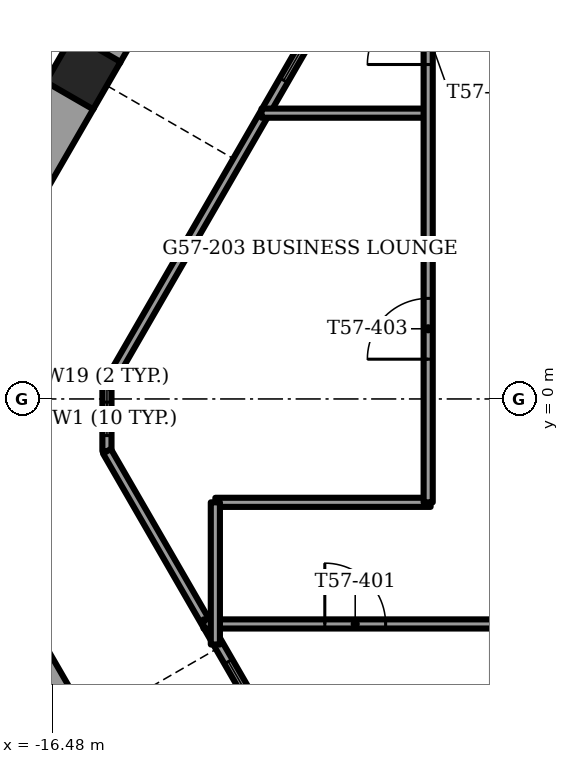
"""IFC4 building model, lengths in metres.
Left out: names, types, materials, properties, quantities, classifications, styles, units other than length and angle.
Written with IfcOpenShell. Run it as: python <this file> out.ifc"""

import sys

from ifc_helpers import new_model, si_unit, direction, frame, frame_2d, origin, origin_2d, place, context, subcontext, project, spatial, rectangle, extrude, element, fill, save


model = new_model("IFC4")
c1 = context("Model", 3, precision=1e-05, world=origin(), true_north=direction((0.0, 1.0)))
c2 = subcontext(c1, "Body", "Model", "MODEL_VIEW")
j1 = project(units=[si_unit("LENGTHUNIT", "METRE"), si_unit("PLANEANGLEUNIT", "RADIAN")], contexts=[c1])
p1 = place(None, origin())
s1 = spatial("IfcSite", under=j1, at=p1, CompositionType="ELEMENT")
p2 = place(p1, origin())
s2 = spatial("IfcBuilding", under=s1, at=p2, CompositionType="ELEMENT")
p3 = place(p2, frame((0.0, 0.0, 229.5)))
s3 = spatial("IfcBuildingStorey", under=s2, at=p3, CompositionType="ELEMENT", Elevation=229.5)
p4 = place(p3, frame((-15.974, 5.378, -1.2), z_axis=(0.0, 0.0, 1.0), x_axis=(0.5, 0.866025403784, 0.0)))
e1 = element("IfcColumn", 1, at=p4, inside=s3, PredefinedType="COLUMN", context=c2, shape_type="SweptSolid", body=[
    extrude(rectangle(XDim=0.9, YDim=0.9, at=origin_2d()), origin(), (0.0, 0.0, 1.0), 3.75),
])
p5 = place(p3, frame((-12.854, 10.781, 0.0), z_axis=(0.0, 0.0, 1.0), x_axis=(-0.499997265274, -0.866026982673, 0.0)))
e2 = element("IfcWall", 2, at=p5, inside=s3, PredefinedType="PARAPET", context=c2, shape_type="SweptSolid", body=[
    extrude(rectangle(XDim=5.819, YDim=0.9, at=frame_2d((2.909, 0.0))), origin(), (0.0, 0.0, 1.0), 1.1),
])
p6 = place(p3, frame((-16.184, 5.014, 0.0), z_axis=(0.0, 0.0, 1.0), x_axis=(-0.499994028088, -0.866028851642, 0.0)))
e3 = element("IfcWall", 3, at=p6, inside=s3, PredefinedType="PARAPET", context=c2, shape_type="SweptSolid", body=[
    extrude(rectangle(XDim=5.681, YDim=0.9, at=frame_2d((2.84, 0.0))), origin(), (0.0, 0.0, 1.0), 1.1),
])
p7 = place(p3, frame((-19.024, -0.749, 0.0), z_axis=(0.0, 0.0, 1.0), x_axis=(0.499995206172, -0.866028171485, 0.0)))
e4 = element("IfcWall", 4, at=p7, inside=s3, PredefinedType="PARAPET", context=c2, shape_type="SweptSolid", body=[
    extrude(rectangle(XDim=5.114, YDim=0.9, at=frame_2d((2.557, 0.0))), origin(), (0.0, 0.0, 1.0), 1.1),
])
p8 = place(p3, frame((-10.479, 9.045, 0.0), z_axis=(0.0, 0.0, 1.0), x_axis=(-0.49998469459, -0.866034240187, 0.0)))
e5 = element("IfcWall", 5, at=p8, inside=s3, PredefinedType="SOLIDWALL", context=c2, shape_type="SweptSolid", body=[
    extrude(rectangle(XDim=10.208, YDim=0.15, at=frame_2d((5.104, 0.0))), origin(), (0.0, 0.0, 1.0), 3.45),
])
p9 = place(p8, frame((2.894, 0.0, 0.15)))
e6 = element("IfcOpeningElement", 6, at=p9, cuts=e5, PredefinedType="OPENING", context=c2, shape_type="SweptSolid", body=[
    extrude(rectangle(XDim=1.5, YDim=2.2, at=frame_2d((0.75, 1.1))), frame((0.0, 0.075, 0.0), z_axis=(0.0, -1.0, 0.0), x_axis=(1.0, 0.0, 0.0)), (0.0, 0.0, 1.0), 0.15),
])
p10 = place(p3, frame((-15.583, -0.86, 0.0), z_axis=(0.0, 0.0, 1.0), x_axis=(0.499995050918, -0.866028261119, 0.0)))
e7 = element("IfcWall", 7, at=p10, inside=s3, PredefinedType="SOLIDWALL", context=c2, shape_type="SweptSolid", body=[
    extrude(rectangle(XDim=10.208, YDim=0.15, at=frame_2d((5.104, 0.0))), origin(), (0.0, 0.0, 1.0), 3.45),
])
p11 = place(p10, frame((3.994, 0.0, 0.15)))
e8 = element("IfcOpeningElement", 8, at=p11, cuts=e7, PredefinedType="OPENING", context=c2, shape_type="SweptSolid", body=[
    extrude(rectangle(XDim=0.9, YDim=2.2, at=frame_2d((0.45, 1.1))), frame((0.0, 0.075, 0.0), z_axis=(0.0, -1.0, 0.0), x_axis=(1.0, 0.0, 0.0)), (0.0, 0.0, 1.0), 0.15),
])
p12 = place(p10, frame((5.347, 0.0, 0.15)))
e9 = element("IfcOpeningElement", 9, at=p12, cuts=e7, PredefinedType="OPENING", context=c2, shape_type="SweptSolid", body=[
    extrude(rectangle(XDim=1.4, YDim=2.2, at=frame_2d((0.7, 1.1))), frame((0.0, 0.075, 0.0), z_axis=(0.0, -1.0, 0.0), x_axis=(1.0, 0.0, 0.0)), (0.0, 0.0, 1.0), 0.15),
])
p13 = place(p3, frame((-15.583, 0.205, 0.0), z_axis=(0.0, 0.0, 1.0), x_axis=(0.0, -1.0, 0.0)))
e10 = element("IfcWall", 10, at=p13, inside=s3, PredefinedType="SOLIDWALL", context=c2, shape_type="SweptSolid", body=[
    extrude(rectangle(XDim=1.065, YDim=0.15, at=frame_2d((0.532, 0.0))), origin(), (0.0, 0.0, 1.0), 3.45),
])
p14 = place(p13, frame((0.258, 0.0, 0.15)))
e11 = element("IfcOpeningElement", 11, at=p14, cuts=e10, PredefinedType="OPENING", context=c2, shape_type="SweptSolid", body=[
    extrude(rectangle(XDim=0.55, YDim=2.2, at=frame_2d((0.275, 1.1))), frame((0.0, 0.075, 0.0), z_axis=(0.0, -1.0, 0.0), x_axis=(1.0, 0.0, 0.0)), (0.0, 0.0, 1.0), 0.15),
])
p15 = place(p3, frame((-13.995, -3.7, 0.0), z_axis=(0.0, 0.0, 1.0), x_axis=(1.0, 0.0, 0.0)))
e12 = element("IfcWall", 12, at=p15, inside=s3, PredefinedType="PARTITIONING", context=c2, shape_type="SweptSolid", body=[
    extrude(rectangle(XDim=4.835, YDim=0.15, at=frame_2d((2.417, 0.0))), origin(), (0.0, 0.0, 1.0), 3.45),
])
p16 = place(p15, frame((1.995, 0.0, 0.0)))
e13 = element("IfcOpeningElement", 13, at=p16, cuts=e12, PredefinedType="OPENING", context=c2, shape_type="SweptSolid", body=[
    extrude(rectangle(XDim=1.0, YDim=2.1, at=frame_2d((0.5, 1.05))), frame((0.0, 0.075, 0.0), z_axis=(0.0, -1.0, 0.0), x_axis=(1.0, 0.0, 0.0)), (0.0, 0.0, 1.0), 0.15),
])
p17 = place(p3, frame((-13.8, -1.7, 0.0), z_axis=(0.0, 0.0, 1.0), x_axis=(1.0, 0.0, 0.0)))
e14 = element("IfcWall", 14, at=p17, inside=s3, PredefinedType="PARTITIONING", context=c2, shape_type="SweptSolid", body=[
    extrude(rectangle(XDim=3.54, YDim=0.15, at=frame_2d((1.77, 0.0))), origin(), (0.0, 0.0, 1.0), 3.45),
])
p18 = place(p3, frame((-13.04, 4.7, 0.0), z_axis=(0.0, 0.0, 1.0), x_axis=(1.0, 0.0, 0.0)))
e15 = element("IfcWall", 15, at=p18, inside=s3, PredefinedType="PARTITIONING", context=c2, shape_type="SweptSolid", body=[
    extrude(rectangle(XDim=2.74, YDim=0.15, at=frame_2d((1.37, 0.0))), origin(), (0.0, 0.0, 1.0), 3.45),
])
p19 = place(p3, frame((-10.3, -1.7, 0.0), z_axis=(0.0, 0.0, 1.0), x_axis=(0.0, 1.0, 0.0)))
e16 = element("IfcWall", 16, at=p19, inside=s3, PredefinedType="PARTITIONING", context=c2, shape_type="SweptSolid", body=[
    extrude(rectangle(XDim=9.0, YDim=0.15, at=frame_2d((4.5, 0.0))), origin(), (0.0, 0.0, 1.0), 3.45),
])
p20 = place(p19, frame((2.354, 0.0, 0.0)))
e17 = element("IfcOpeningElement", 17, at=p20, cuts=e16, PredefinedType="OPENING", context=c2, shape_type="SweptSolid", body=[
    extrude(rectangle(XDim=1.0, YDim=2.1, at=frame_2d((0.5, 1.05))), frame((0.0, 0.075, 0.0), z_axis=(0.0, -1.0, 0.0), x_axis=(1.0, 0.0, 0.0)), (0.0, 0.0, 1.0), 0.15),
])
p21 = place(p19, frame((7.2, 0.0, 0.0)))
e18 = element("IfcOpeningElement", 18, at=p21, cuts=e16, PredefinedType="OPENING", context=c2, shape_type="SweptSolid", body=[
    extrude(rectangle(XDim=1.0, YDim=2.1, at=frame_2d((0.5, 1.05))), frame((0.0, 0.075, 0.0), z_axis=(0.0, -1.0, 0.0), x_axis=(1.0, 0.0, 0.0)), (0.0, 0.0, 1.0), 0.15),
])
p22 = place(p3, frame((-13.8, -4.038, 0.0), z_axis=(0.0, 0.0, 1.0), x_axis=(0.0, 1.0, 0.0)))
e19 = element("IfcWall", 19, at=p22, inside=s3, PredefinedType="PARTITIONING", context=c2, shape_type="SweptSolid", body=[
    extrude(rectangle(XDim=2.338, YDim=0.15, at=frame_2d((1.169, 0.0))), origin(), (0.0, 0.0, 1.0), 3.45),
])
p23 = place(p9, origin())
e20 = element("IfcWindow", 20, at=p23, inside=s3, PartitioningType="SINGLE_PANEL", PredefinedType="WINDOW", context=c2, shape_type="SweptSolid", body=[
    extrude(rectangle(XDim=1.5, YDim=2.2, at=frame_2d((0.75, 1.1))), frame((0.0, 0.03, 0.0), z_axis=(0.0, -1.0, 0.0), x_axis=(1.0, 0.0, 0.0)), (0.0, 0.0, 1.0), 0.06),
])
fill(e6, e20)
p24 = place(p11, origin())
e21 = element("IfcWindow", 21, at=p24, inside=s3, PartitioningType="SINGLE_PANEL", PredefinedType="WINDOW", context=c2, shape_type="SweptSolid", body=[
    extrude(rectangle(XDim=0.9, YDim=2.2, at=frame_2d((0.45, 1.1))), frame((0.0, 0.03, 0.0), z_axis=(0.0, -1.0, 0.0), x_axis=(1.0, 0.0, 0.0)), (0.0, 0.0, 1.0), 0.06),
])
fill(e8, e21)
p25 = place(p14, origin())
e22 = element("IfcWindow", 22, at=p25, inside=s3, PartitioningType="SINGLE_PANEL", PredefinedType="WINDOW", context=c2, shape_type="SweptSolid", body=[
    extrude(rectangle(XDim=0.55, YDim=2.2, at=frame_2d((0.275, 1.1))), frame((0.0, 0.03, 0.0), z_axis=(0.0, -1.0, 0.0), x_axis=(1.0, 0.0, 0.0)), (0.0, 0.0, 1.0), 0.06),
])
fill(e11, e22)
p26 = place(p16, origin())
e23 = element("IfcDoor", 23, at=p26, inside=s3, OperationType="SINGLE_SWING_RIGHT", PredefinedType="DOOR", context=c2, shape_type="SweptSolid", body=[
    extrude(rectangle(XDim=1.0, YDim=2.1, at=frame_2d((0.5, 1.05))), frame((0.0, 0.025, 0.0), z_axis=(0.0, -1.0, 0.0), x_axis=(1.0, 0.0, 0.0)), (0.0, 0.0, 1.0), 0.05),
])
fill(e13, e23)
p27 = place(p20, origin())
e24 = element("IfcDoor", 24, at=p27, inside=s3, OperationType="SINGLE_SWING_LEFT", PredefinedType="DOOR", context=c2, shape_type="SweptSolid", body=[
    extrude(rectangle(XDim=1.0, YDim=2.1, at=frame_2d((0.5, 1.05))), frame((0.0, 0.025, 0.0), z_axis=(0.0, -1.0, 0.0), x_axis=(1.0, 0.0, 0.0)), (0.0, 0.0, 1.0), 0.05),
])
fill(e17, e24)
p28 = place(p21, origin())
e25 = element("IfcDoor", 25, at=p28, inside=s3, OperationType="SINGLE_SWING_LEFT", PredefinedType="DOOR", context=c2, shape_type="SweptSolid", body=[
    extrude(rectangle(XDim=1.0, YDim=2.1, at=frame_2d((0.5, 1.05))), frame((0.0, 0.025, 0.0), z_axis=(0.0, -1.0, 0.0), x_axis=(1.0, 0.0, 0.0)), (0.0, 0.0, 1.0), 0.05),
])
fill(e18, e25)
save(model, sys.argv[1])
